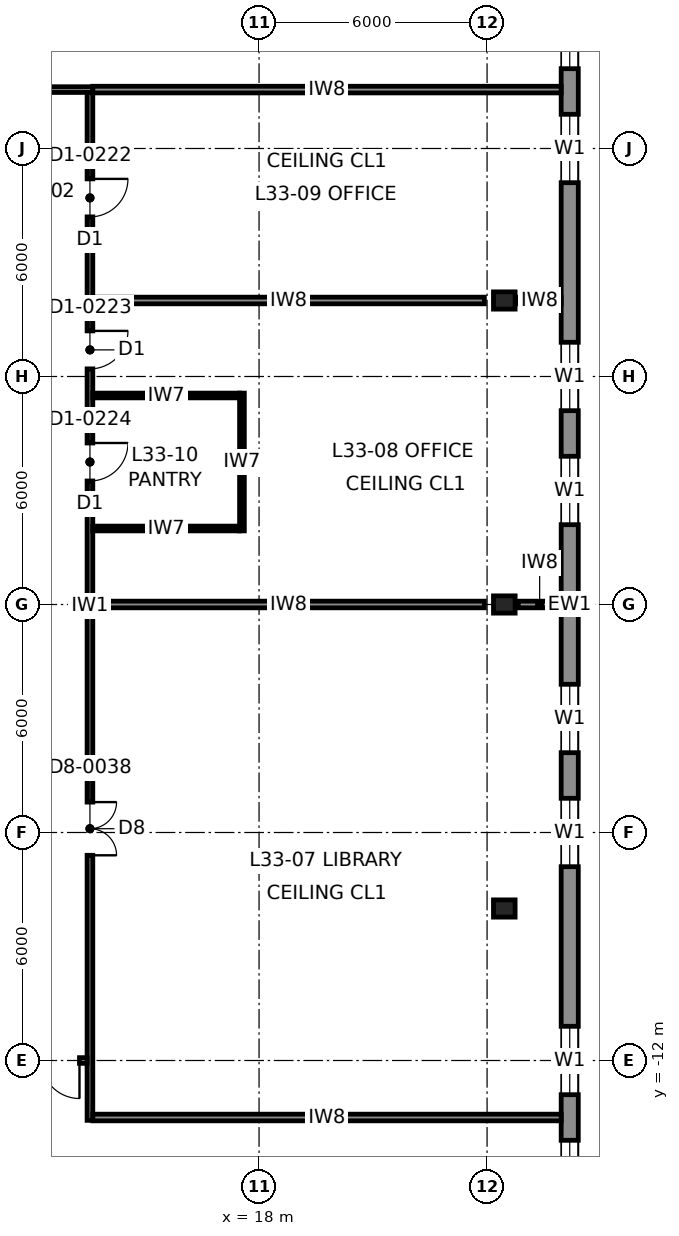
"""IFC4 building model, lengths in metres.
Left out: names, types, materials, properties, quantities, classifications, styles, units other than length and angle.
Written with IfcOpenShell. Run it as: python <this file> out.ifc"""

import sys

from ifc_helpers import new_model, si_unit, direction, frame, frame_2d, origin, origin_2d, place, context, subcontext, project, spatial, rectangle, i_section, extrude, element, fill, save


model = new_model("IFC4")
c1 = context("Model", 3, precision=1e-05, world=origin(), true_north=direction((0.0, 1.0)))
c2 = subcontext(c1, "Body", "Model", "MODEL_VIEW")
j1 = project(units=[si_unit("LENGTHUNIT", "METRE"), si_unit("PLANEANGLEUNIT", "RADIAN")], contexts=[c1])
p1 = place(None, origin())
s1 = spatial("IfcSite", under=j1, at=p1, CompositionType="ELEMENT")
p2 = place(p1, origin())
s2 = spatial("IfcBuilding", under=s1, at=p2, CompositionType="ELEMENT")
p3 = place(p2, frame((0.0, 0.0, 159.8)))
s3 = spatial("IfcBuildingStorey", under=s2, at=p3, CompositionType="ELEMENT", Elevation=159.8)
for number, where, z_axis, x_axis in (
    (1, (24.453, 0.0, 0.0), (-0.04, 0.0, 0.999), (0.0, -1.0, 0.0)),
    (2, (24.453, -8.0, 0.0), (-0.04, 0.0, 0.999), (0.0, -1.0, 0.0)),
    (3, (24.453, 8.0, 0.0), (-0.04, 0.0, 0.999), (0.0, -1.0, 0.0)),
):
    element("IfcColumn", number, at=place(p3, frame(where, z_axis=z_axis, x_axis=x_axis)), inside=s3, PredefinedType="COLUMN", context=c2, shape_type="SweptSolid", body=[
        extrude(i_section(OverallWidth=0.454, OverallDepth=0.569, WebThickness=0.078, FlangeThickness=0.125, at=origin_2d()), origin(), (0.0, 0.0, 1.0), 4.003),
    ])
p4 = place(p3, frame((26.175, -21.9, 0.0), z_axis=(0.0, 0.0, 1.0), x_axis=(0.0, 1.0, 0.0)))
e4 = element("IfcWall", 4, at=p4, inside=s3, PredefinedType="SOLIDWALL", context=c2, shape_type="SweptSolid", body=[
    extrude(rectangle(XDim=43.8, YDim=0.45, at=frame_2d((21.9, 0.0))), origin(), (0.0, 0.0, 1.0), 3.83),
])
p5 = place(p4, frame((6.0, 0.0, 0.7)))
e5 = element("IfcOpeningElement", 5, at=p5, cuts=e4, PredefinedType="OPENING", context=c2, shape_type="SweptSolid", body=[
    extrude(rectangle(XDim=1.8, YDim=2.6, at=frame_2d((0.9, 1.3))), frame((0.0, 0.235, 0.0), z_axis=(0.0, -1.0, 0.0), x_axis=(1.0, 0.0, 0.0)), (0.0, 0.0, 1.0), 0.47),
])
p6 = place(p4, frame((9.0, 0.0, 0.7)))
e6 = element("IfcOpeningElement", 6, at=p6, cuts=e4, PredefinedType="OPENING", context=c2, shape_type="SweptSolid", body=[
    extrude(rectangle(XDim=1.8, YDim=2.6, at=frame_2d((0.9, 1.3))), frame((0.0, 0.235, 0.0), z_axis=(0.0, -1.0, 0.0), x_axis=(1.0, 0.0, 0.0)), (0.0, 0.0, 1.0), 0.47),
])
p7 = place(p4, frame((15.0, 0.0, 0.7)))
e7 = element("IfcOpeningElement", 7, at=p7, cuts=e4, PredefinedType="OPENING", context=c2, shape_type="SweptSolid", body=[
    extrude(rectangle(XDim=1.8, YDim=2.6, at=frame_2d((0.9, 1.3))), frame((0.0, 0.235, 0.0), z_axis=(0.0, -1.0, 0.0), x_axis=(1.0, 0.0, 0.0)), (0.0, 0.0, 1.0), 0.47),
])
p8 = place(p4, frame((18.0, 0.0, 0.7)))
e8 = element("IfcOpeningElement", 8, at=p8, cuts=e4, PredefinedType="OPENING", context=c2, shape_type="SweptSolid", body=[
    extrude(rectangle(XDim=1.8, YDim=2.6, at=frame_2d((0.9, 1.3))), frame((0.0, 0.235, 0.0), z_axis=(0.0, -1.0, 0.0), x_axis=(1.0, 0.0, 0.0)), (0.0, 0.0, 1.0), 0.47),
])
p9 = place(p4, frame((24.0, 0.0, 0.7)))
e9 = element("IfcOpeningElement", 9, at=p9, cuts=e4, PredefinedType="OPENING", context=c2, shape_type="SweptSolid", body=[
    extrude(rectangle(XDim=1.8, YDim=2.6, at=frame_2d((0.9, 1.3))), frame((0.0, 0.235, 0.0), z_axis=(0.0, -1.0, 0.0), x_axis=(1.0, 0.0, 0.0)), (0.0, 0.0, 1.0), 0.47),
])
p10 = place(p4, frame((27.0, 0.0, 0.7)))
e10 = element("IfcOpeningElement", 10, at=p10, cuts=e4, PredefinedType="OPENING", context=c2, shape_type="SweptSolid", body=[
    extrude(rectangle(XDim=1.8, YDim=2.6, at=frame_2d((0.9, 1.3))), frame((0.0, 0.235, 0.0), z_axis=(0.0, -1.0, 0.0), x_axis=(1.0, 0.0, 0.0)), (0.0, 0.0, 1.0), 0.47),
])
p11 = place(p4, frame((33.0, 0.0, 0.7)))
e11 = element("IfcOpeningElement", 11, at=p11, cuts=e4, PredefinedType="OPENING", context=c2, shape_type="SweptSolid", body=[
    extrude(rectangle(XDim=1.8, YDim=2.6, at=frame_2d((0.9, 1.3))), frame((0.0, 0.235, 0.0), z_axis=(0.0, -1.0, 0.0), x_axis=(1.0, 0.0, 0.0)), (0.0, 0.0, 1.0), 0.47),
])
p12 = place(p4, frame((36.0, 0.0, 0.7)))
e12 = element("IfcOpeningElement", 12, at=p12, cuts=e4, PredefinedType="OPENING", context=c2, shape_type="SweptSolid", body=[
    extrude(rectangle(XDim=1.8, YDim=2.6, at=frame_2d((0.9, 1.3))), frame((0.0, 0.235, 0.0), z_axis=(0.0, -1.0, 0.0), x_axis=(1.0, 0.0, 0.0)), (0.0, 0.0, 1.0), 0.47),
])
p13 = place(p3, frame((-13.625, 13.55, 0.0), z_axis=(0.0, 0.0, 1.0), x_axis=(1.0, 0.0, 0.0)))
e13 = element("IfcWall", 13, at=p13, inside=s3, PredefinedType="PARTITIONING", context=c2, shape_type="SweptSolid", body=[
    extrude(rectangle(XDim=27.25, YDim=0.15, at=frame_2d((13.625, 0.0))), origin(), (0.0, 0.0, 1.0), 3.83),
])
p14 = place(p13, frame((2.425, 0.0, 0.0)))
e14 = element("IfcOpeningElement", 14, at=p14, cuts=e13, PredefinedType="OPENING", context=c2, shape_type="SweptSolid", body=[
    extrude(rectangle(XDim=1.0, YDim=2.3, at=frame_2d((0.5, 1.15))), frame((0.0, 0.085, 0.0), z_axis=(0.0, -1.0, 0.0), x_axis=(1.0, 0.0, 0.0)), (0.0, 0.0, 1.0), 0.17),
])
p15 = place(p13, frame((9.125, 0.0, 0.0)))
e15 = element("IfcOpeningElement", 15, at=p15, cuts=e13, PredefinedType="OPENING", context=c2, shape_type="SweptSolid", body=[
    extrude(rectangle(XDim=1.0, YDim=2.3, at=frame_2d((0.5, 1.15))), frame((0.0, 0.085, 0.0), z_axis=(0.0, -1.0, 0.0), x_axis=(1.0, 0.0, 0.0)), (0.0, 0.0, 1.0), 0.17),
])
p16 = place(p13, frame((17.125, 0.0, 0.0)))
e16 = element("IfcOpeningElement", 16, at=p16, cuts=e13, PredefinedType="OPENING", context=c2, shape_type="SweptSolid", body=[
    extrude(rectangle(XDim=1.0, YDim=2.3, at=frame_2d((0.5, 1.15))), frame((0.0, 0.085, 0.0), z_axis=(0.0, -1.0, 0.0), x_axis=(1.0, 0.0, 0.0)), (0.0, 0.0, 1.0), 0.17),
])
p17 = place(p13, frame((23.825, 0.0, 0.0)))
e17 = element("IfcOpeningElement", 17, at=p17, cuts=e13, PredefinedType="OPENING", context=c2, shape_type="SweptSolid", body=[
    extrude(rectangle(XDim=1.0, YDim=2.3, at=frame_2d((0.5, 1.15))), frame((0.0, 0.085, 0.0), z_axis=(0.0, -1.0, 0.0), x_axis=(1.0, 0.0, 0.0)), (0.0, 0.0, 1.0), 0.17),
])
p18 = place(p3, frame((13.55, -13.575, 0.0), z_axis=(0.0, 0.0, 1.0), x_axis=(0.0, 1.0, 0.0)))
e18 = element("IfcWall", 18, at=p18, inside=s3, PredefinedType="PARTITIONING", context=c2, shape_type="SweptSolid", body=[
    extrude(rectangle(XDim=27.05, YDim=0.15, at=frame_2d((13.525, 0.0))), origin(), (0.0, 0.0, 1.0), 3.83),
])
p19 = place(p18, frame((6.975, 0.0, 0.0)))
e19 = element("IfcOpeningElement", 19, at=p19, cuts=e18, PredefinedType="OPENING", context=c2, shape_type="SweptSolid", body=[
    extrude(rectangle(XDim=1.4, YDim=2.3, at=frame_2d((0.7, 1.15))), frame((0.0, 0.085, 0.0), z_axis=(0.0, -1.0, 0.0), x_axis=(1.0, 0.0, 0.0)), (0.0, 0.0, 1.0), 0.17),
])
p20 = place(p18, frame((19.775, 0.0, 0.0)))
e20 = element("IfcOpeningElement", 20, at=p20, cuts=e18, PredefinedType="OPENING", context=c2, shape_type="SweptSolid", body=[
    extrude(rectangle(XDim=1.0, YDim=2.3, at=frame_2d((0.5, 1.15))), frame((0.0, 0.085, 0.0), z_axis=(0.0, -1.0, 0.0), x_axis=(1.0, 0.0, 0.0)), (0.0, 0.0, 1.0), 0.17),
])
p21 = place(p18, frame((23.775, 0.0, 0.0)))
e21 = element("IfcOpeningElement", 21, at=p21, cuts=e18, PredefinedType="OPENING", context=c2, shape_type="SweptSolid", body=[
    extrude(rectangle(XDim=1.0, YDim=2.3, at=frame_2d((0.5, 1.15))), frame((0.0, 0.085, 0.0), z_axis=(0.0, -1.0, 0.0), x_axis=(1.0, 0.0, 0.0)), (0.0, 0.0, 1.0), 0.17),
])
p22 = place(p18, frame((16.825, 0.0, 0.0)))
e22 = element("IfcOpeningElement", 22, at=p22, cuts=e18, PredefinedType="OPENING", context=c2, shape_type="SweptSolid", body=[
    extrude(rectangle(XDim=1.0, YDim=2.3, at=frame_2d((0.5, 1.15))), frame((0.0, 0.085, 0.0), z_axis=(0.0, -1.0, 0.0), x_axis=(1.0, 0.0, 0.0)), (0.0, 0.0, 1.0), 0.17),
])
p23 = place(p3, frame((13.475, -12.0, 0.0), z_axis=(0.0, 0.0, 1.0), x_axis=(-1.0, 0.0, 0.0)))
e23 = element("IfcWall", 23, at=p23, inside=s3, PredefinedType="PARTITIONING", context=c2, shape_type="SweptSolid", body=[
    extrude(rectangle(XDim=1.475, YDim=0.15, at=frame_2d((0.738, 0.0))), origin(), (0.0, 0.0, 1.0), 3.83),
])
p24 = place(p23, frame((0.2, 0.0, 0.0)))
e24 = element("IfcOpeningElement", 24, at=p24, cuts=e23, PredefinedType="OPENING", context=c2, shape_type="SweptSolid", body=[
    extrude(rectangle(XDim=1.0, YDim=2.3, at=frame_2d((0.5, 1.15))), frame((0.0, 0.085, 0.0), z_axis=(0.0, -1.0, 0.0), x_axis=(1.0, 0.0, 0.0)), (0.0, 0.0, 1.0), 0.17),
])
for number, where, z_axis, x_axis in (
    (25, (13.625, 13.55, 0.0), (0.0, 0.0, 1.0), (1.0, 0.0, 0.0)),
    (26, (25.95, -13.5, 0.0), (0.0, 0.0, 1.0), (-1.0, 0.0, 0.0)),
):
    element("IfcWall", number, at=place(p3, frame(where, z_axis=z_axis, x_axis=x_axis)), inside=s3, PredefinedType="PARTITIONING", context=c2, shape_type="SweptSolid", body=[
        extrude(rectangle(XDim=12.325, YDim=0.175, at=frame_2d((6.163, 0.0))), origin(), (0.0, 0.0, 1.0), 3.83),
    ])
p25 = place(p3, frame((13.625, 0.0, 0.0), z_axis=(0.0, 0.0, 1.0), x_axis=(1.0, 0.0, 0.0)))
e27 = element("IfcWall", 27, at=p25, inside=s3, PredefinedType="PARTITIONING", context=c2, shape_type="SweptSolid", body=[
    extrude(rectangle(XDim=10.303, YDim=0.175, at=frame_2d((5.151, 0.0))), origin(), (0.0, 0.0, 1.0), 2.84),
])
p26 = place(p3, frame((24.817, 0.0, 0.0), z_axis=(0.0, 0.0, 1.0), x_axis=(1.0, 0.0, 0.0)))
e28 = element("IfcWall", 28, at=p26, inside=s3, PredefinedType="PARTITIONING", context=c2, shape_type="SweptSolid", body=[
    extrude(rectangle(XDim=1.133, YDim=0.175, at=frame_2d((0.566, 0.0))), origin(), (0.0, 0.0, 1.0), 3.83),
])
p27 = place(p3, frame((13.625, 8.0, 0.0), z_axis=(0.0, 0.0, 1.0), x_axis=(1.0, 0.0, 0.0)))
e29 = element("IfcWall", 29, at=p27, inside=s3, PredefinedType="PARTITIONING", context=c2, shape_type="SweptSolid", body=[
    extrude(rectangle(XDim=10.303, YDim=0.175, at=frame_2d((5.151, 0.0))), origin(), (0.0, 0.0, 1.0), 2.84),
])
p28 = place(p3, frame((24.817, 8.0, 0.0), z_axis=(0.0, 0.0, 1.0), x_axis=(1.0, 0.0, 0.0)))
e30 = element("IfcWall", 30, at=p28, inside=s3, PredefinedType="PARTITIONING", context=c2, shape_type="SweptSolid", body=[
    extrude(rectangle(XDim=1.133, YDim=0.175, at=frame_2d((0.566, 0.0))), origin(), (0.0, 0.0, 1.0), 3.83),
])
p29 = place(p3, frame((17.55, 1.938, 0.0), z_axis=(0.0, 0.0, 1.0), x_axis=(0.0, 1.0, 0.0)))
e31 = element("IfcWall", 31, at=p29, inside=s3, PredefinedType="PARTITIONING", context=c2, shape_type="SweptSolid", body=[
    extrude(rectangle(XDim=3.625, YDim=0.125, at=frame_2d((1.812, 0.0))), origin(), (0.0, 0.0, 1.0), 3.83),
])
for number, where, z_axis, x_axis in (
    (32, (13.625, 2.0, 0.0), (0.0, 0.0, 1.0), (1.0, 0.0, 0.0)),
    (33, (13.625, 5.5, 0.0), (0.0, 0.0, 1.0), (1.0, 0.0, 0.0)),
):
    element("IfcWall", number, at=place(p3, frame(where, z_axis=z_axis, x_axis=x_axis)), inside=s3, PredefinedType="PARTITIONING", context=c2, shape_type="SweptSolid", body=[
        extrude(rectangle(XDim=3.863, YDim=0.125, at=frame_2d((1.931, 0.0))), origin(), (0.0, 0.0, 1.0), 3.83),
    ])
p30 = place(p5, origin())
e34 = element("IfcWindow", 34, at=p30, inside=s3, PartitioningType="SINGLE_PANEL", PredefinedType="WINDOW", context=c2, shape_type="SweptSolid", body=[
    extrude(rectangle(XDim=1.8, YDim=2.6, at=frame_2d((0.9, 1.3))), frame((0.0, 0.03, 0.0), z_axis=(0.0, -1.0, 0.0), x_axis=(1.0, 0.0, 0.0)), (0.0, 0.0, 1.0), 0.06),
])
fill(e5, e34)
p31 = place(p6, origin())
e35 = element("IfcWindow", 35, at=p31, inside=s3, PartitioningType="SINGLE_PANEL", PredefinedType="WINDOW", context=c2, shape_type="SweptSolid", body=[
    extrude(rectangle(XDim=1.8, YDim=2.6, at=frame_2d((0.9, 1.3))), frame((0.0, 0.03, 0.0), z_axis=(0.0, -1.0, 0.0), x_axis=(1.0, 0.0, 0.0)), (0.0, 0.0, 1.0), 0.06),
])
fill(e6, e35)
p32 = place(p7, origin())
e36 = element("IfcWindow", 36, at=p32, inside=s3, PartitioningType="SINGLE_PANEL", PredefinedType="WINDOW", context=c2, shape_type="SweptSolid", body=[
    extrude(rectangle(XDim=1.8, YDim=2.6, at=frame_2d((0.9, 1.3))), frame((0.0, 0.03, 0.0), z_axis=(0.0, -1.0, 0.0), x_axis=(1.0, 0.0, 0.0)), (0.0, 0.0, 1.0), 0.06),
])
fill(e7, e36)
p33 = place(p8, origin())
e37 = element("IfcWindow", 37, at=p33, inside=s3, PartitioningType="SINGLE_PANEL", PredefinedType="WINDOW", context=c2, shape_type="SweptSolid", body=[
    extrude(rectangle(XDim=1.8, YDim=2.6, at=frame_2d((0.9, 1.3))), frame((0.0, 0.03, 0.0), z_axis=(0.0, -1.0, 0.0), x_axis=(1.0, 0.0, 0.0)), (0.0, 0.0, 1.0), 0.06),
])
fill(e8, e37)
p34 = place(p9, origin())
e38 = element("IfcWindow", 38, at=p34, inside=s3, PartitioningType="SINGLE_PANEL", PredefinedType="WINDOW", context=c2, shape_type="SweptSolid", body=[
    extrude(rectangle(XDim=1.8, YDim=2.6, at=frame_2d((0.9, 1.3))), frame((0.0, 0.03, 0.0), z_axis=(0.0, -1.0, 0.0), x_axis=(1.0, 0.0, 0.0)), (0.0, 0.0, 1.0), 0.06),
])
fill(e9, e38)
p35 = place(p10, origin())
e39 = element("IfcWindow", 39, at=p35, inside=s3, PartitioningType="SINGLE_PANEL", PredefinedType="WINDOW", context=c2, shape_type="SweptSolid", body=[
    extrude(rectangle(XDim=1.8, YDim=2.6, at=frame_2d((0.9, 1.3))), frame((0.0, 0.03, 0.0), z_axis=(0.0, -1.0, 0.0), x_axis=(1.0, 0.0, 0.0)), (0.0, 0.0, 1.0), 0.06),
])
fill(e10, e39)
p36 = place(p11, origin())
e40 = element("IfcWindow", 40, at=p36, inside=s3, PartitioningType="SINGLE_PANEL", PredefinedType="WINDOW", context=c2, shape_type="SweptSolid", body=[
    extrude(rectangle(XDim=1.8, YDim=2.6, at=frame_2d((0.9, 1.3))), frame((0.0, 0.03, 0.0), z_axis=(0.0, -1.0, 0.0), x_axis=(1.0, 0.0, 0.0)), (0.0, 0.0, 1.0), 0.06),
])
fill(e11, e40)
p37 = place(p12, origin())
e41 = element("IfcWindow", 41, at=p37, inside=s3, PartitioningType="SINGLE_PANEL", PredefinedType="WINDOW", context=c2, shape_type="SweptSolid", body=[
    extrude(rectangle(XDim=1.8, YDim=2.6, at=frame_2d((0.9, 1.3))), frame((0.0, 0.03, 0.0), z_axis=(0.0, -1.0, 0.0), x_axis=(1.0, 0.0, 0.0)), (0.0, 0.0, 1.0), 0.06),
])
fill(e12, e41)
p38 = place(p24, origin())
e42 = element("IfcDoor", 42, at=p38, inside=s3, OperationType="SINGLE_SWING_LEFT", PredefinedType="DOOR", context=c2, shape_type="SweptSolid", body=[
    extrude(rectangle(XDim=1.0, YDim=2.3, at=frame_2d((0.5, 1.15))), frame((0.0, 0.025, 0.0), z_axis=(0.0, -1.0, 0.0), x_axis=(1.0, 0.0, 0.0)), (0.0, 0.0, 1.0), 0.05),
])
fill(e24, e42)
p39 = place(p19, frame((1.4, 0.0, 0.0), z_axis=(0.0, 0.0, 1.0), x_axis=(-1.0, 0.0, 0.0)))
e43 = element("IfcDoor", 43, at=p39, inside=s3, OperationType="DOUBLE_DOOR_SINGLE_SWING", PredefinedType="DOOR", context=c2, shape_type="SweptSolid", body=[
    extrude(rectangle(XDim=1.4, YDim=2.3, at=frame_2d((0.7, 1.15))), frame((0.0, 0.025, 0.0), z_axis=(0.0, -1.0, 0.0), x_axis=(1.0, 0.0, 0.0)), (0.0, 0.0, 1.0), 0.05),
])
fill(e19, e43)
p40 = place(p20, frame((1.0, 0.0, 0.0), z_axis=(0.0, 0.0, 1.0), x_axis=(-1.0, 0.0, 0.0)))
e44 = element("IfcDoor", 44, at=p40, inside=s3, OperationType="SINGLE_SWING_LEFT", PredefinedType="DOOR", context=c2, shape_type="SweptSolid", body=[
    extrude(rectangle(XDim=1.0, YDim=2.3, at=frame_2d((0.5, 1.15))), frame((0.0, 0.025, 0.0), z_axis=(0.0, -1.0, 0.0), x_axis=(1.0, 0.0, 0.0)), (0.0, 0.0, 1.0), 0.05),
])
fill(e20, e44)
p41 = place(p21, frame((1.0, 0.0, 0.0), z_axis=(0.0, 0.0, 1.0), x_axis=(-1.0, 0.0, 0.0)))
e45 = element("IfcDoor", 45, at=p41, inside=s3, OperationType="SINGLE_SWING_LEFT", PredefinedType="DOOR", context=c2, shape_type="SweptSolid", body=[
    extrude(rectangle(XDim=1.0, YDim=2.3, at=frame_2d((0.5, 1.15))), frame((0.0, 0.025, 0.0), z_axis=(0.0, -1.0, 0.0), x_axis=(1.0, 0.0, 0.0)), (0.0, 0.0, 1.0), 0.05),
])
fill(e21, e45)
p42 = place(p22, frame((1.0, 0.0, 0.0), z_axis=(0.0, 0.0, 1.0), x_axis=(-1.0, 0.0, 0.0)))
e46 = element("IfcDoor", 46, at=p42, inside=s3, OperationType="SINGLE_SWING_LEFT", PredefinedType="DOOR", context=c2, shape_type="SweptSolid", body=[
    extrude(rectangle(XDim=1.0, YDim=2.3, at=frame_2d((0.5, 1.15))), frame((0.0, 0.025, 0.0), z_axis=(0.0, -1.0, 0.0), x_axis=(1.0, 0.0, 0.0)), (0.0, 0.0, 1.0), 0.05),
])
fill(e22, e46)
save(model, sys.argv[1])
